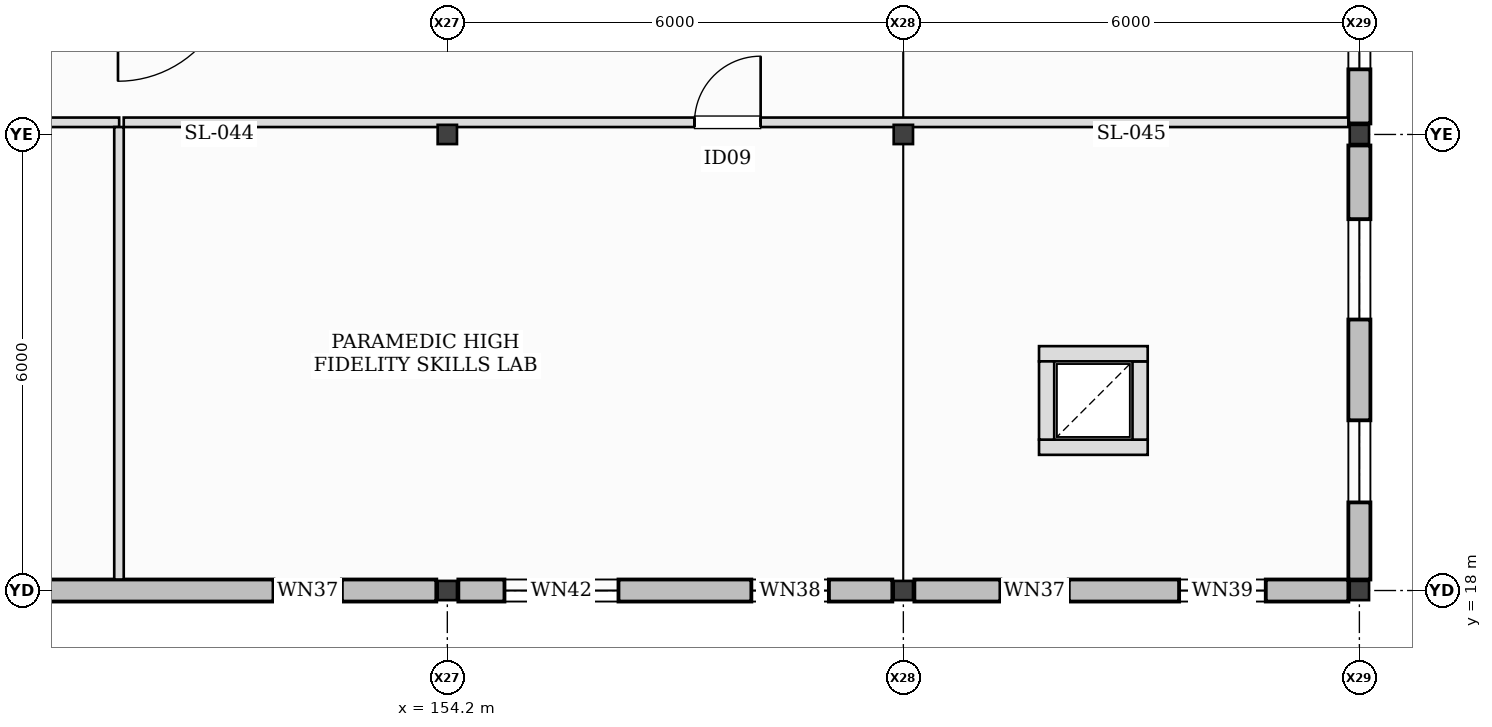
"""IFC4 building model, lengths in metres.
Left out: names, types, materials, properties, quantities, classifications, styles, units other than length and angle.
Written with IfcOpenShell. Run it as: python <this file> out.ifc"""

import sys

from ifc_helpers import new_model, si_unit, direction, frame, frame_2d, origin, origin_2d, place, context, subcontext, project, spatial, rectangle, i_section, extrude, element, fill, save


model = new_model("IFC4")
c1 = context("Model", 3, precision=1e-05, world=origin(), true_north=direction((0.0, 1.0)))
c2 = subcontext(c1, "Body", "Model", "MODEL_VIEW")
j1 = project(units=[si_unit("LENGTHUNIT", "METRE"), si_unit("PLANEANGLEUNIT", "RADIAN")], contexts=[c1])
p1 = place(None, origin())
s1 = spatial("IfcSite", under=j1, at=p1, CompositionType="ELEMENT")
p2 = place(p1, origin())
s2 = spatial("IfcBuilding", under=s1, at=p2, CompositionType="ELEMENT")
p3 = place(p2, frame((0.0, 0.0, 10.0)))
s3 = spatial("IfcBuildingStorey", under=s2, at=p3, CompositionType="ELEMENT", Elevation=10.0)
for number, where, z_axis, x_axis in (
    (1, (154.2, 18.0, 0.0), (0.0, 0.0, 1.0), (1.0, 0.0, 0.0)),
    (2, (154.2, 24.0, 0.0), (0.0, 0.0, 1.0), (1.0, 0.0, 0.0)),
    (3, (160.2, 18.0, 0.0), (0.0, 0.0, 1.0), (1.0, 0.0, 0.0)),
    (4, (160.2, 24.0, 0.0), (0.0, 0.0, 1.0), (1.0, 0.0, 0.0)),
    (5, (166.2, 18.0, 0.0), (0.0, 0.0, 1.0), (1.0, 0.0, 0.0)),
    (6, (166.2, 24.0, 0.0), (0.0, 0.0, 1.0), (1.0, 0.0, 0.0)),
):
    element("IfcColumn", number, at=place(p3, frame(where, z_axis=z_axis, x_axis=x_axis)), inside=s3, PredefinedType="COLUMN", context=c2, shape_type="SweptSolid", body=[
        extrude(i_section(OverallWidth=0.254, OverallDepth=0.253, WebThickness=0.009, FlangeThickness=0.014, at=origin_2d()), origin(), (0.0, 0.0, 1.0), 4.0),
    ])
p4 = place(p3, frame((148.345, 18.0, 0.0), z_axis=(0.0, 0.0, 1.0), x_axis=(1.0, 0.0, 0.0)))
e7 = element("IfcWall", 7, at=p4, inside=s3, PredefinedType="STANDARD", context=c2, shape_type="SweptSolid", body=[
    extrude(rectangle(XDim=5.71, YDim=0.29, at=frame_2d((2.855, 0.0))), origin(), (0.0, 0.0, 1.0), 4.0),
])
p5 = place(p4, frame((3.567, 0.0, 0.86)))
e8 = element("IfcOpeningElement", 8, at=p5, cuts=e7, PredefinedType="OPENING", context=c2, shape_type="SweptSolid", body=[
    extrude(rectangle(XDim=0.9, YDim=0.9, at=frame_2d((0.45, 0.45))), frame((0.0, 0.155, 0.0), z_axis=(0.0, -1.0, 0.0), x_axis=(1.0, 0.0, 0.0)), (0.0, 0.0, 1.0), 0.31),
])
p6 = place(p3, frame((154.345, 18.0, 0.0), z_axis=(0.0, 0.0, 1.0), x_axis=(1.0, 0.0, 0.0)))
e9 = element("IfcWall", 9, at=p6, inside=s3, PredefinedType="STANDARD", context=c2, shape_type="SweptSolid", body=[
    extrude(rectangle(XDim=5.71, YDim=0.29, at=frame_2d((2.855, 0.0))), origin(), (0.0, 0.0, 1.0), 4.0),
])
p7 = place(p6, frame((0.607, 0.0, 1.28)))
e10 = element("IfcOpeningElement", 10, at=p7, cuts=e9, PredefinedType="OPENING", context=c2, shape_type="SweptSolid", body=[
    extrude(rectangle(XDim=1.5, YDim=1.5, at=frame_2d((0.75, 0.75))), frame((0.0, 0.155, 0.0), z_axis=(0.0, -1.0, 0.0), x_axis=(1.0, 0.0, 0.0)), (0.0, 0.0, 1.0), 0.31),
])
p8 = place(p6, frame((3.855, 0.0, 1.18)))
e11 = element("IfcOpeningElement", 11, at=p8, cuts=e9, PredefinedType="OPENING", context=c2, shape_type="SweptSolid", body=[
    extrude(rectangle(XDim=1.02, YDim=1.02, at=frame_2d((0.51, 0.51))), frame((0.0, 0.155, 0.0), z_axis=(0.0, -1.0, 0.0), x_axis=(1.0, 0.0, 0.0)), (0.0, 0.0, 1.0), 0.31),
])
p9 = place(p3, frame((160.345, 18.0, 0.0), z_axis=(0.0, 0.0, 1.0), x_axis=(1.0, 0.0, 0.0)))
e12 = element("IfcWall", 12, at=p9, inside=s3, PredefinedType="STANDARD", context=c2, shape_type="SweptSolid", body=[
    extrude(rectangle(XDim=5.71, YDim=0.29, at=frame_2d((2.855, 0.0))), origin(), (0.0, 0.0, 1.0), 4.0),
])
p10 = place(p9, frame((1.131, 0.0, 0.86)))
e13 = element("IfcOpeningElement", 13, at=p10, cuts=e12, PredefinedType="OPENING", context=c2, shape_type="SweptSolid", body=[
    extrude(rectangle(XDim=0.9, YDim=0.9, at=frame_2d((0.45, 0.45))), frame((0.0, 0.155, 0.0), z_axis=(0.0, -1.0, 0.0), x_axis=(1.0, 0.0, 0.0)), (0.0, 0.0, 1.0), 0.31),
])
p11 = place(p9, frame((3.483, 0.0, 1.42)))
e14 = element("IfcOpeningElement", 14, at=p11, cuts=e12, PredefinedType="OPENING", context=c2, shape_type="SweptSolid", body=[
    extrude(rectangle(XDim=1.14, YDim=1.14, at=frame_2d((0.57, 0.57))), frame((0.0, 0.155, 0.0), z_axis=(0.0, -1.0, 0.0), x_axis=(1.0, 0.0, 0.0)), (0.0, 0.0, 1.0), 0.31),
])
p12 = place(p3, frame((166.2, 18.145, 0.0), z_axis=(0.0, 0.0, 1.0), x_axis=(0.0, 1.0, 0.0)))
e15 = element("IfcWall", 15, at=p12, inside=s3, PredefinedType="STANDARD", context=c2, shape_type="SweptSolid", body=[
    extrude(rectangle(XDim=5.71, YDim=0.29, at=frame_2d((2.855, 0.0))), origin(), (0.0, 0.0, 1.0), 3.463),
])
p13 = place(p12, frame((1.014, 0.0, 0.86)))
e16 = element("IfcOpeningElement", 16, at=p13, cuts=e15, PredefinedType="OPENING", context=c2, shape_type="SweptSolid", body=[
    extrude(rectangle(XDim=1.08, YDim=1.08, at=frame_2d((0.54, 0.54))), frame((0.0, 0.155, 0.0), z_axis=(0.0, -1.0, 0.0), x_axis=(1.0, 0.0, 0.0)), (0.0, 0.0, 1.0), 0.31),
])
p14 = place(p12, frame((3.42, 0.0, 1.42)))
e17 = element("IfcOpeningElement", 17, at=p14, cuts=e15, PredefinedType="OPENING", context=c2, shape_type="SweptSolid", body=[
    extrude(rectangle(XDim=1.32, YDim=1.32, at=frame_2d((0.66, 0.66))), frame((0.0, 0.155, 0.0), z_axis=(0.0, -1.0, 0.0), x_axis=(1.0, 0.0, 0.0)), (0.0, 0.0, 1.0), 0.31),
])
p15 = place(p3, frame((166.2, 24.145, 0.0), z_axis=(0.0, 0.0, 1.0), x_axis=(0.0, 1.0, 0.0)))
e18 = element("IfcWall", 18, at=p15, inside=s3, PredefinedType="STANDARD", context=c2, shape_type="SweptSolid", body=[
    extrude(rectangle(XDim=5.71, YDim=0.29, at=frame_2d((2.855, 0.0))), origin(), (0.0, 0.0, 1.0), 3.463),
])
p16 = place(p15, frame((0.712, 0.0, 1.18)))
e19 = element("IfcOpeningElement", 19, at=p16, cuts=e18, PredefinedType="OPENING", context=c2, shape_type="SweptSolid", body=[
    extrude(rectangle(XDim=1.2, YDim=1.2, at=frame_2d((0.6, 0.6))), frame((0.0, 0.155, 0.0), z_axis=(0.0, -1.0, 0.0), x_axis=(1.0, 0.0, 0.0)), (0.0, 0.0, 1.0), 0.31),
])
p17 = place(p15, frame((3.582, 0.0, 0.96)))
e20 = element("IfcOpeningElement", 20, at=p17, cuts=e18, PredefinedType="OPENING", context=c2, shape_type="SweptSolid", body=[
    extrude(rectangle(XDim=1.44, YDim=1.44, at=frame_2d((0.72, 0.72))), frame((0.0, 0.155, 0.0), z_axis=(0.0, -1.0, 0.0), x_axis=(1.0, 0.0, 0.0)), (0.0, 0.0, 1.0), 0.31),
])
p18 = place(p3, frame((161.985, 19.885, 0.0), z_axis=(0.0, 0.0, 1.0), x_axis=(1.0, 0.0, 0.0)))
e21 = element("IfcWall", 21, at=p18, inside=s3, PredefinedType="PARTITIONING", context=c2, shape_type="SweptSolid", body=[
    extrude(rectangle(XDim=1.43, YDim=0.2, at=frame_2d((0.715, 0.0))), origin(), (0.0, 0.0, 1.0), 3.74),
])
p19 = place(p3, frame((163.315, 19.985, 0.0), z_axis=(0.0, 0.0, 1.0), x_axis=(0.0, 1.0, 0.0)))
e22 = element("IfcWall", 22, at=p19, inside=s3, PredefinedType="PARTITIONING", context=c2, shape_type="SweptSolid", body=[
    extrude(rectangle(XDim=1.03, YDim=0.2, at=frame_2d((0.515, 0.0))), origin(), (0.0, 0.0, 1.0), 3.74),
])
p20 = place(p3, frame((163.415, 21.115, 0.0), z_axis=(0.0, 0.0, 1.0), x_axis=(-1.0, 0.0, 0.0)))
e23 = element("IfcWall", 23, at=p20, inside=s3, PredefinedType="PARTITIONING", context=c2, shape_type="SweptSolid", body=[
    extrude(rectangle(XDim=1.43, YDim=0.2, at=frame_2d((0.715, 0.0))), origin(), (0.0, 0.0, 1.0), 3.74),
])
p21 = place(p3, frame((162.085, 21.015, 0.0), z_axis=(0.0, 0.0, 1.0), x_axis=(0.0, -1.0, 0.0)))
e24 = element("IfcWall", 24, at=p21, inside=s3, PredefinedType="PARTITIONING", context=c2, shape_type="SweptSolid", body=[
    extrude(rectangle(XDim=1.03, YDim=0.2, at=frame_2d((0.515, 0.0))), origin(), (0.0, 0.0, 1.0), 3.74),
])
p22 = place(p3, frame((133.1, 24.16, 0.0), z_axis=(0.0, 0.0, 1.0), x_axis=(1.0, 0.0, 0.0)))
e25 = element("IfcWall", 25, at=p22, inside=s3, PredefinedType="PARTITIONING", context=c2, shape_type="SweptSolid", body=[
    extrude(rectangle(XDim=16.782, YDim=0.125, at=frame_2d((8.391, 0.0))), origin(), (0.0, 0.0, 1.0), 3.74),
])
p23 = place(p3, frame((149.88, 24.097, 0.0), z_axis=(0.0, 0.0, 1.0), x_axis=(0.0, -1.0, 0.0)))
e26 = element("IfcWall", 26, at=p23, inside=s3, PredefinedType="PARTITIONING", context=c2, shape_type="SweptSolid", body=[
    extrude(rectangle(XDim=5.952, YDim=0.125, at=frame_2d((2.976, 0.0))), origin(), (0.0, 0.0, 1.0), 3.74),
])
p24 = place(p3, frame((149.942, 24.16, 0.0), z_axis=(0.0, 0.0, 1.0), x_axis=(1.0, 0.0, 0.0)))
e27 = element("IfcWall", 27, at=p24, inside=s3, PredefinedType="PARTITIONING", context=c2, shape_type="SweptSolid", body=[
    extrude(rectangle(XDim=16.113, YDim=0.125, at=frame_2d((8.056, 0.0))), origin(), (0.0, 0.0, 1.0), 3.74),
])
p25 = place(p24, frame((7.51, 0.0, 0.0)))
e28 = element("IfcOpeningElement", 28, at=p25, cuts=e27, PredefinedType="OPENING", context=c2, shape_type="SweptSolid", body=[
    extrude(rectangle(XDim=0.87, YDim=2.06, at=frame_2d((0.435, 1.03))), frame((0.0, 0.073, 0.0), z_axis=(0.0, -1.0, 0.0), x_axis=(1.0, 0.0, 0.0)), (0.0, 0.0, 1.0), 0.145),
])
p26 = place(p5, origin())
e29 = element("IfcWindow", 29, at=p26, inside=s3, PartitioningType="SINGLE_PANEL", PredefinedType="WINDOW", context=c2, shape_type="SweptSolid", body=[
    extrude(rectangle(XDim=0.9, YDim=0.9, at=frame_2d((0.45, 0.45))), frame((0.0, 0.03, 0.0), z_axis=(0.0, -1.0, 0.0), x_axis=(1.0, 0.0, 0.0)), (0.0, 0.0, 1.0), 0.06),
])
fill(e8, e29)
p27 = place(p7, origin())
e30 = element("IfcWindow", 30, at=p27, inside=s3, PartitioningType="SINGLE_PANEL", PredefinedType="WINDOW", context=c2, shape_type="SweptSolid", body=[
    extrude(rectangle(XDim=1.5, YDim=1.5, at=frame_2d((0.75, 0.75))), frame((0.0, 0.03, 0.0), z_axis=(0.0, -1.0, 0.0), x_axis=(1.0, 0.0, 0.0)), (0.0, 0.0, 1.0), 0.06),
])
fill(e10, e30)
p28 = place(p8, origin())
e31 = element("IfcWindow", 31, at=p28, inside=s3, PartitioningType="SINGLE_PANEL", PredefinedType="WINDOW", context=c2, shape_type="SweptSolid", body=[
    extrude(rectangle(XDim=1.02, YDim=1.02, at=frame_2d((0.51, 0.51))), frame((0.0, 0.03, 0.0), z_axis=(0.0, -1.0, 0.0), x_axis=(1.0, 0.0, 0.0)), (0.0, 0.0, 1.0), 0.06),
])
fill(e11, e31)
p29 = place(p10, origin())
e32 = element("IfcWindow", 32, at=p29, inside=s3, PartitioningType="SINGLE_PANEL", PredefinedType="WINDOW", context=c2, shape_type="SweptSolid", body=[
    extrude(rectangle(XDim=0.9, YDim=0.9, at=frame_2d((0.45, 0.45))), frame((0.0, 0.03, 0.0), z_axis=(0.0, -1.0, 0.0), x_axis=(1.0, 0.0, 0.0)), (0.0, 0.0, 1.0), 0.06),
])
fill(e13, e32)
p30 = place(p11, origin())
e33 = element("IfcWindow", 33, at=p30, inside=s3, PartitioningType="SINGLE_PANEL", PredefinedType="WINDOW", context=c2, shape_type="SweptSolid", body=[
    extrude(rectangle(XDim=1.14, YDim=1.14, at=frame_2d((0.57, 0.57))), frame((0.0, 0.03, 0.0), z_axis=(0.0, -1.0, 0.0), x_axis=(1.0, 0.0, 0.0)), (0.0, 0.0, 1.0), 0.06),
])
fill(e14, e33)
p31 = place(p13, origin())
e34 = element("IfcWindow", 34, at=p31, inside=s3, PartitioningType="SINGLE_PANEL", PredefinedType="WINDOW", context=c2, shape_type="SweptSolid", body=[
    extrude(rectangle(XDim=1.08, YDim=1.08, at=frame_2d((0.54, 0.54))), frame((0.0, 0.03, 0.0), z_axis=(0.0, -1.0, 0.0), x_axis=(1.0, 0.0, 0.0)), (0.0, 0.0, 1.0), 0.06),
])
fill(e16, e34)
p32 = place(p14, origin())
e35 = element("IfcWindow", 35, at=p32, inside=s3, PartitioningType="SINGLE_PANEL", PredefinedType="WINDOW", context=c2, shape_type="SweptSolid", body=[
    extrude(rectangle(XDim=1.32, YDim=1.32, at=frame_2d((0.66, 0.66))), frame((0.0, 0.03, 0.0), z_axis=(0.0, -1.0, 0.0), x_axis=(1.0, 0.0, 0.0)), (0.0, 0.0, 1.0), 0.06),
])
fill(e17, e35)
p33 = place(p16, origin())
e36 = element("IfcWindow", 36, at=p33, inside=s3, PartitioningType="SINGLE_PANEL", PredefinedType="WINDOW", context=c2, shape_type="SweptSolid", body=[
    extrude(rectangle(XDim=1.2, YDim=1.2, at=frame_2d((0.6, 0.6))), frame((0.0, 0.03, 0.0), z_axis=(0.0, -1.0, 0.0), x_axis=(1.0, 0.0, 0.0)), (0.0, 0.0, 1.0), 0.06),
])
fill(e19, e36)
p34 = place(p25, frame((0.87, 0.0, 0.0), z_axis=(0.0, 0.0, 1.0), x_axis=(-1.0, 0.0, 0.0)))
e37 = element("IfcDoor", 37, at=p34, inside=s3, OperationType="SINGLE_SWING_RIGHT", PredefinedType="DOOR", context=c2, shape_type="SweptSolid", body=[
    extrude(rectangle(XDim=0.87, YDim=2.06, at=frame_2d((0.435, 1.03))), frame((0.0, 0.025, 0.0), z_axis=(0.0, -1.0, 0.0), x_axis=(1.0, 0.0, 0.0)), (0.0, 0.0, 1.0), 0.05),
])
fill(e28, e37)
save(model, sys.argv[1])
